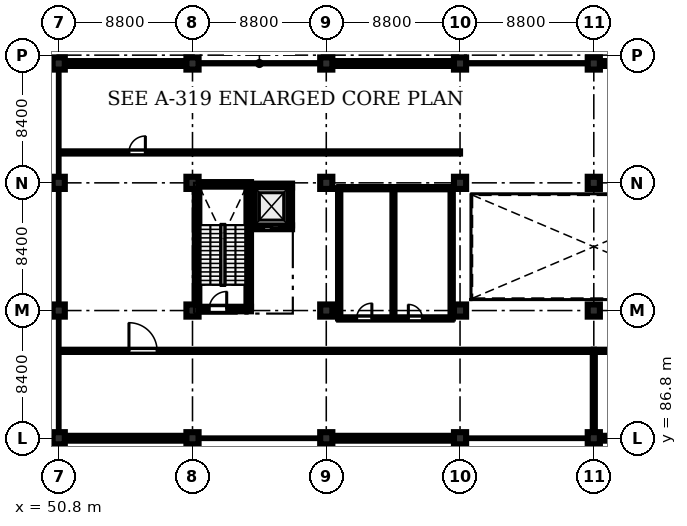
"""IFC4 building model, lengths in metres.
Left out: names, types, materials, properties, quantities, classifications, styles, units other than length and angle.
Written with IfcOpenShell. Run it as: python <this file> out.ifc"""

import sys

from ifc_helpers import new_model, si_unit, direction, frame, frame_2d, origin, origin_2d, place, context, subcontext, project, spatial, rectangle, extrude, element, fill, save


model = new_model("IFC4")
c1 = context("Model", 3, precision=1e-05, world=origin(), true_north=direction((0.0, 1.0)))
c2 = subcontext(c1, "Body", "Model", "MODEL_VIEW")
j1 = project(units=[si_unit("LENGTHUNIT", "METRE"), si_unit("PLANEANGLEUNIT", "RADIAN")], contexts=[c1])
p1 = place(None, origin())
s1 = spatial("IfcSite", under=j1, at=p1, CompositionType="ELEMENT")
p2 = place(p1, origin())
s2 = spatial("IfcBuilding", under=s1, at=p2, CompositionType="ELEMENT")
p3 = place(p2, frame((0.0, 0.0, 5.4)))
s3 = spatial("IfcBuildingStorey", under=s2, at=p3, CompositionType="ELEMENT", Elevation=5.4)
for number, where, z_axis, x_axis in (
    (1, (50.8, 86.8, 0.0), (0.0, 0.0, 1.0), (1.0, 0.0, 0.0)),
    (2, (50.8, 95.2, 0.0), (0.0, 0.0, 1.0), (1.0, 0.0, 0.0)),
    (3, (50.8, 103.6, 0.0), (0.0, 0.0, 1.0), (1.0, 0.0, 0.0)),
    (4, (50.8, 111.45, 0.0), (0.0, 0.0, 1.0), (1.0, 0.0, 0.0)),
    (5, (59.6, 86.8, 0.0), (0.0, 0.0, 1.0), (1.0, 0.0, 0.0)),
    (6, (59.6, 95.2, 0.0), (0.0, 0.0, 1.0), (1.0, 0.0, 0.0)),
    (7, (59.6, 103.6, 0.0), (0.0, 0.0, 1.0), (1.0, 0.0, 0.0)),
    (8, (59.6, 111.45, 0.0), (0.0, 0.0, 1.0), (1.0, 0.0, 0.0)),
    (9, (68.4, 86.8, 0.0), (0.0, 0.0, 1.0), (1.0, 0.0, 0.0)),
    (10, (68.4, 95.2, 0.0), (0.0, 0.0, 1.0), (1.0, 0.0, 0.0)),
    (11, (68.4, 103.6, 0.0), (0.0, 0.0, 1.0), (1.0, 0.0, 0.0)),
    (12, (68.4, 111.45, 0.0), (0.0, 0.0, 1.0), (1.0, 0.0, 0.0)),
    (13, (77.2, 86.8, 0.0), (0.0, 0.0, 1.0), (1.0, 0.0, 0.0)),
    (14, (77.2, 95.2, 0.0), (0.0, 0.0, 1.0), (1.0, 0.0, 0.0)),
    (15, (77.2, 103.6, 0.0), (0.0, 0.0, 1.0), (1.0, 0.0, 0.0)),
    (16, (77.2, 111.45, 0.0), (0.0, 0.0, 1.0), (1.0, 0.0, 0.0)),
    (17, (86.0, 86.8, 0.0), (0.0, 0.0, 1.0), (1.0, 0.0, 0.0)),
    (18, (86.0, 95.2, 0.0), (0.0, 0.0, 1.0), (1.0, 0.0, 0.0)),
    (19, (86.0, 103.6, 0.0), (0.0, 0.0, 1.0), (1.0, 0.0, 0.0)),
    (20, (86.0, 111.45, 0.0), (0.0, 0.0, 1.0), (1.0, 0.0, 0.0)),
):
    element("IfcColumn", number, at=place(p3, frame(where, z_axis=z_axis, x_axis=x_axis)), inside=s3, PredefinedType="COLUMN", context=c2, shape_type="SweptSolid", body=[
        extrude(rectangle(XDim=0.8, YDim=0.8, at=origin_2d()), origin(), (0.0, 0.0, 1.0), 4.58),
    ])
p4 = place(p3, frame((59.75, 95.3, 0.0), z_axis=(0.0, 0.0, 1.0), x_axis=(1.0, 0.0, 0.0)))
e21 = element("IfcWall", 21, at=p4, inside=s3, PredefinedType="SHEAR", context=c2, shape_type="SweptSolid", body=[
    extrude(rectangle(XDim=3.7, YDim=0.3, at=frame_2d((1.85, 0.0))), origin(), (0.0, 0.0, 1.0), 4.58),
])
p5 = place(p4, frame((0.95, 0.0, 0.0)))
e22 = element("IfcOpeningElement", 22, at=p5, cuts=e21, PredefinedType="OPENING", context=c2, shape_type="SweptSolid", body=[
    extrude(rectangle(XDim=1.15, YDim=2.15, at=frame_2d((0.575, 1.075))), frame((0.0, 0.16, 0.0), z_axis=(0.0, -1.0, 0.0), x_axis=(1.0, 0.0, 0.0)), (0.0, 0.0, 1.0), 0.32),
])
p6 = place(p3, frame((59.75, 103.5, 0.0), z_axis=(0.0, 0.0, 1.0), x_axis=(1.0, 0.0, 0.0)))
e23 = element("IfcWall", 23, at=p6, inside=s3, PredefinedType="SHEAR", context=c2, shape_type="SweptSolid", body=[
    extrude(rectangle(XDim=3.7, YDim=0.3, at=frame_2d((1.85, 0.0))), origin(), (0.0, 0.0, 1.0), 4.58),
])
for number, where, z_axis, x_axis in (
    (24, (59.9, 95.45, 0.0), (0.0, 0.0, 1.0), (0.0, 1.0, 0.0)),
    (25, (63.3, 95.45, 0.0), (0.0, 0.0, 1.0), (0.0, 1.0, 0.0)),
):
    element("IfcWall", number, at=place(p3, frame(where, z_axis=z_axis, x_axis=x_axis)), inside=s3, PredefinedType="SHEAR", context=c2, shape_type="SweptSolid", body=[
        extrude(rectangle(XDim=7.9, YDim=0.3, at=frame_2d((3.95, 0.0))), origin(), (0.0, 0.0, 1.0), 4.58),
    ])
p7 = place(p3, frame((63.45, 100.675, 0.0), z_axis=(0.0, 0.0, 1.0), x_axis=(1.0, 0.0, 0.0)))
e26 = element("IfcWall", 26, at=p7, inside=s3, PredefinedType="SHEAR", context=c2, shape_type="SweptSolid", body=[
    extrude(rectangle(XDim=2.7, YDim=0.25, at=frame_2d((1.35, 0.0))), origin(), (0.0, 0.0, 1.0), 4.58),
])
p8 = place(p7, frame((0.83, 0.0, 0.0)))
e27 = element("IfcOpeningElement", 27, at=p8, cuts=e26, PredefinedType="OPENING", context=c2, shape_type="SweptSolid", body=[
    extrude(rectangle(XDim=1.04, YDim=2.15, at=frame_2d((0.52, 1.075))), frame((0.0, 0.135, 0.0), z_axis=(0.0, -1.0, 0.0), x_axis=(1.0, 0.0, 0.0)), (0.0, 0.0, 1.0), 0.27),
])
p9 = place(p3, frame((63.45, 103.425, 0.0), z_axis=(0.0, 0.0, 1.0), x_axis=(1.0, 0.0, 0.0)))
e28 = element("IfcWall", 28, at=p9, inside=s3, PredefinedType="SHEAR", context=c2, shape_type="SweptSolid", body=[
    extrude(rectangle(XDim=2.7, YDim=0.25, at=frame_2d((1.35, 0.0))), origin(), (0.0, 0.0, 1.0), 4.58),
])
for number, where, z_axis, x_axis in (
    (29, (63.575, 100.8, 0.0), (0.0, 0.0, 1.0), (0.0, 1.0, 0.0)),
    (30, (66.025, 100.8, 0.0), (0.0, 0.0, 1.0), (0.0, 1.0, 0.0)),
):
    element("IfcWall", number, at=place(p3, frame(where, z_axis=z_axis, x_axis=x_axis)), inside=s3, PredefinedType="SHEAR", context=c2, shape_type="SweptSolid", body=[
        extrude(rectangle(XDim=2.5, YDim=0.25, at=frame_2d((1.25, 0.0))), origin(), (0.0, 0.0, 1.0), 4.58),
    ])
p10 = place(p3, frame((51.2, 111.45, 0.0), z_axis=(0.0, 0.0, 1.0), x_axis=(1.0, 0.0, 0.0)))
e31 = element("IfcWall", 31, at=p10, inside=s3, PredefinedType="STANDARD", context=c2, shape_type="SweptSolid", body=[
    extrude(rectangle(XDim=8.0, YDim=0.32, at=frame_2d((4.0, 0.0))), origin(), (0.0, 0.0, 1.0), 3.83),
])
p11 = place(p10, frame((1.1, 0.0, 0.9)))
e32 = element("IfcOpeningElement", 32, at=p11, cuts=e31, PredefinedType="OPENING", context=c2, shape_type="SweptSolid", body=[
    extrude(rectangle(XDim=2.4, YDim=2.2, at=frame_2d((1.2, 1.1))), frame((0.0, 0.17, 0.0), z_axis=(0.0, -1.0, 0.0), x_axis=(1.0, 0.0, 0.0)), (0.0, 0.0, 1.0), 0.34),
])
p12 = place(p10, frame((4.7, 0.0, 0.9)))
e33 = element("IfcOpeningElement", 33, at=p12, cuts=e31, PredefinedType="OPENING", context=c2, shape_type="SweptSolid", body=[
    extrude(rectangle(XDim=2.4, YDim=2.2, at=frame_2d((1.2, 1.1))), frame((0.0, 0.17, 0.0), z_axis=(0.0, -1.0, 0.0), x_axis=(1.0, 0.0, 0.0)), (0.0, 0.0, 1.0), 0.34),
])
p13 = place(p3, frame((59.2, 86.8, 0.0), z_axis=(0.0, 0.0, 1.0), x_axis=(-1.0, 0.0, 0.0)))
e34 = element("IfcWall", 34, at=p13, inside=s3, PredefinedType="STANDARD", context=c2, shape_type="SweptSolid", body=[
    extrude(rectangle(XDim=8.0, YDim=0.32, at=frame_2d((4.0, 0.0))), origin(), (0.0, 0.0, 1.0), 3.93),
])
p14 = place(p13, frame((2.8, 0.0, 0.95)))
e35 = element("IfcOpeningElement", 35, at=p14, cuts=e34, PredefinedType="OPENING", context=c2, shape_type="SweptSolid", body=[
    extrude(rectangle(XDim=2.0, YDim=2.2, at=frame_2d((1.0, 1.1))), frame((0.0, 0.17, 0.0), z_axis=(0.0, -1.0, 0.0), x_axis=(1.0, 0.0, 0.0)), (0.0, 0.0, 1.0), 0.34),
])
p15 = place(p3, frame((68.8, 111.45, 0.0), z_axis=(0.0, 0.0, 1.0), x_axis=(1.0, 0.0, 0.0)))
e36 = element("IfcWall", 36, at=p15, inside=s3, PredefinedType="STANDARD", context=c2, shape_type="SweptSolid", body=[
    extrude(rectangle(XDim=8.0, YDim=0.32, at=frame_2d((4.0, 0.0))), origin(), (0.0, 0.0, 1.0), 3.83),
])
p16 = place(p15, frame((1.1, 0.0, 0.9)))
e37 = element("IfcOpeningElement", 37, at=p16, cuts=e36, PredefinedType="OPENING", context=c2, shape_type="SweptSolid", body=[
    extrude(rectangle(XDim=2.4, YDim=2.2, at=frame_2d((1.2, 1.1))), frame((0.0, 0.17, 0.0), z_axis=(0.0, -1.0, 0.0), x_axis=(1.0, 0.0, 0.0)), (0.0, 0.0, 1.0), 0.34),
])
p17 = place(p15, frame((4.7, 0.0, 0.9)))
e38 = element("IfcOpeningElement", 38, at=p17, cuts=e36, PredefinedType="OPENING", context=c2, shape_type="SweptSolid", body=[
    extrude(rectangle(XDim=2.4, YDim=2.2, at=frame_2d((1.2, 1.1))), frame((0.0, 0.17, 0.0), z_axis=(0.0, -1.0, 0.0), x_axis=(1.0, 0.0, 0.0)), (0.0, 0.0, 1.0), 0.34),
])
p18 = place(p3, frame((76.8, 86.8, 0.0), z_axis=(0.0, 0.0, 1.0), x_axis=(-1.0, 0.0, 0.0)))
e39 = element("IfcWall", 39, at=p18, inside=s3, PredefinedType="STANDARD", context=c2, shape_type="SweptSolid", body=[
    extrude(rectangle(XDim=8.0, YDim=0.32, at=frame_2d((4.0, 0.0))), origin(), (0.0, 0.0, 1.0), 3.93),
])
p19 = place(p18, frame((2.8, 0.0, 0.95)))
e40 = element("IfcOpeningElement", 40, at=p19, cuts=e39, PredefinedType="OPENING", context=c2, shape_type="SweptSolid", body=[
    extrude(rectangle(XDim=2.0, YDim=2.2, at=frame_2d((1.0, 1.1))), frame((0.0, 0.17, 0.0), z_axis=(0.0, -1.0, 0.0), x_axis=(1.0, 0.0, 0.0)), (0.0, 0.0, 1.0), 0.34),
])
p20 = place(p3, frame((86.4, 111.45, 0.0), z_axis=(0.0, 0.0, 1.0), x_axis=(1.0, 0.0, 0.0)))
e41 = element("IfcWall", 41, at=p20, inside=s3, PredefinedType="STANDARD", context=c2, shape_type="SweptSolid", body=[
    extrude(rectangle(XDim=8.0, YDim=0.32, at=frame_2d((4.0, 0.0))), origin(), (0.0, 0.0, 1.0), 3.83),
])
p21 = place(p20, frame((1.1, 0.0, 0.9)))
e42 = element("IfcOpeningElement", 42, at=p21, cuts=e41, PredefinedType="OPENING", context=c2, shape_type="SweptSolid", body=[
    extrude(rectangle(XDim=2.4, YDim=2.2, at=frame_2d((1.2, 1.1))), frame((0.0, 0.17, 0.0), z_axis=(0.0, -1.0, 0.0), x_axis=(1.0, 0.0, 0.0)), (0.0, 0.0, 1.0), 0.34),
])
p22 = place(p20, frame((4.7, 0.0, 0.9)))
e43 = element("IfcOpeningElement", 43, at=p22, cuts=e41, PredefinedType="OPENING", context=c2, shape_type="SweptSolid", body=[
    extrude(rectangle(XDim=2.4, YDim=2.2, at=frame_2d((1.2, 1.1))), frame((0.0, 0.17, 0.0), z_axis=(0.0, -1.0, 0.0), x_axis=(1.0, 0.0, 0.0)), (0.0, 0.0, 1.0), 0.34),
])
p23 = place(p3, frame((94.4, 86.8, 0.0), z_axis=(0.0, 0.0, 1.0), x_axis=(-1.0, 0.0, 0.0)))
e44 = element("IfcWall", 44, at=p23, inside=s3, PredefinedType="STANDARD", context=c2, shape_type="SweptSolid", body=[
    extrude(rectangle(XDim=8.0, YDim=0.32, at=frame_2d((4.0, 0.0))), origin(), (0.0, 0.0, 1.0), 3.93),
])
p24 = place(p23, frame((2.8, 0.0, 0.95)))
e45 = element("IfcOpeningElement", 45, at=p24, cuts=e44, PredefinedType="OPENING", context=c2, shape_type="SweptSolid", body=[
    extrude(rectangle(XDim=2.0, YDim=2.2, at=frame_2d((1.0, 1.1))), frame((0.0, 0.17, 0.0), z_axis=(0.0, -1.0, 0.0), x_axis=(1.0, 0.0, 0.0)), (0.0, 0.0, 1.0), 0.34),
])
p25 = place(p3, frame((69.25, 94.68, 0.0), z_axis=(0.0, 0.0, 1.0), x_axis=(1.0, 0.0, 0.0)))
e46 = element("IfcWall", 46, at=p25, inside=s3, PredefinedType="PARTITIONING", context=c2, shape_type="SweptSolid", body=[
    extrude(rectangle(XDim=7.4, YDim=0.15, at=frame_2d((3.7, 0.0))), origin(), (0.0, 0.0, 1.0), 4.58),
])
p26 = place(p25, frame((1.15, 0.0, 0.0)))
e47 = element("IfcOpeningElement", 47, at=p26, cuts=e46, PredefinedType="OPENING", context=c2, shape_type="SweptSolid", body=[
    extrude(rectangle(XDim=1.0, YDim=2.12, at=frame_2d((0.5, 1.06))), frame((0.0, 0.085, 0.0), z_axis=(0.0, -1.0, 0.0), x_axis=(1.0, 0.0, 0.0)), (0.0, 0.0, 1.0), 0.17),
])
p27 = place(p25, frame((4.55, 0.0, 0.0)))
e48 = element("IfcOpeningElement", 48, at=p27, cuts=e46, PredefinedType="OPENING", context=c2, shape_type="SweptSolid", body=[
    extrude(rectangle(XDim=0.92, YDim=2.1, at=frame_2d((0.46, 1.05))), frame((0.0, 0.085, 0.0), z_axis=(0.0, -1.0, 0.0), x_axis=(1.0, 0.0, 0.0)), (0.0, 0.0, 1.0), 0.17),
])
p28 = place(p3, frame((69.25, 94.68, 0.0), z_axis=(0.0, 0.0, 1.0), x_axis=(0.0, 1.0, 0.0)))
e49 = element("IfcWall", 49, at=p28, inside=s3, PredefinedType="PARTITIONING", context=c2, shape_type="SweptSolid", body=[
    extrude(rectangle(XDim=8.57, YDim=0.15, at=frame_2d((4.285, 0.0))), origin(), (0.0, 0.0, 1.0), 4.58),
])
p29 = place(p3, frame((72.82, 94.68, 0.0), z_axis=(0.0, 0.0, 1.0), x_axis=(0.0, 1.0, 0.0)))
e50 = element("IfcWall", 50, at=p29, inside=s3, PredefinedType="PARTITIONING", context=c2, shape_type="SweptSolid", body=[
    extrude(rectangle(XDim=8.57, YDim=0.135, at=frame_2d((4.285, 0.0))), origin(), (0.0, 0.0, 1.0), 4.24),
])
p30 = place(p3, frame((69.25, 103.25, 0.0), z_axis=(0.0, 0.0, 1.0), x_axis=(1.0, 0.0, 0.0)))
e51 = element("IfcWall", 51, at=p30, inside=s3, PredefinedType="PARTITIONING", context=c2, shape_type="SweptSolid", body=[
    extrude(rectangle(XDim=7.4, YDim=0.15, at=frame_2d((3.7, 0.0))), origin(), (0.0, 0.0, 1.0), 4.58),
])
p31 = place(p3, frame((76.65, 94.68, 0.0), z_axis=(0.0, 0.0, 1.0), x_axis=(0.0, 1.0, 0.0)))
e52 = element("IfcWall", 52, at=p31, inside=s3, PredefinedType="PARTITIONING", context=c2, shape_type="SweptSolid", body=[
    extrude(rectangle(XDim=8.57, YDim=0.15, at=frame_2d((4.285, 0.0))), origin(), (0.0, 0.0, 1.0), 4.58),
])
p32 = place(p3, frame((50.92, 92.55, 0.0), z_axis=(0.0, 0.0, 1.0), x_axis=(1.0, 0.0, 0.0)))
e53 = element("IfcWall", 53, at=p32, inside=s3, PredefinedType="PARTITIONING", context=c2, shape_type="SweptSolid", body=[
    extrude(rectangle(XDim=35.08, YDim=0.145, at=frame_2d((17.54, 0.0))), origin(), (0.0, 0.0, 1.0), 4.58),
])
p33 = place(p32, frame((4.5, 0.0, 0.0)))
e54 = element("IfcOpeningElement", 54, at=p33, cuts=e53, PredefinedType="OPENING", context=c2, shape_type="SweptSolid", body=[
    extrude(rectangle(XDim=1.85, YDim=2.25, at=frame_2d((0.925, 1.125))), frame((0.0, 0.083, 0.0), z_axis=(0.0, -1.0, 0.0), x_axis=(1.0, 0.0, 0.0)), (0.0, 0.0, 1.0), 0.165),
])
p34 = place(p3, frame((86.0, 92.55, 0.0), z_axis=(0.0, 0.0, 1.0), x_axis=(1.0, 0.0, 0.0)))
e55 = element("IfcWall", 55, at=p34, inside=s3, PredefinedType="PARTITIONING", context=c2, shape_type="SweptSolid", body=[
    extrude(rectangle(XDim=35.02, YDim=0.145, at=frame_2d((17.51, 0.0))), origin(), (0.0, 0.0, 1.0), 4.58),
])
p35 = place(p34, frame((4.5, 0.0, 0.0)))
e56 = element("IfcOpeningElement", 56, at=p35, cuts=e55, PredefinedType="OPENING", context=c2, shape_type="SweptSolid", body=[
    extrude(rectangle(XDim=1.85, YDim=2.25, at=frame_2d((0.925, 1.125))), frame((0.0, 0.083, 0.0), z_axis=(0.0, -1.0, 0.0), x_axis=(1.0, 0.0, 0.0)), (0.0, 0.0, 1.0), 0.165),
])
p36 = place(p3, frame((86.0, 86.95, 0.0), z_axis=(0.0, 0.0, 1.0), x_axis=(0.0, 1.0, 0.0)))
e57 = element("IfcWall", 57, at=p36, inside=s3, PredefinedType="PARTITIONING", context=c2, shape_type="SweptSolid", body=[
    extrude(rectangle(XDim=5.6, YDim=0.135, at=frame_2d((2.8, 0.0))), origin(), (0.0, 0.0, 1.0), 3.93),
])
p37 = place(p3, frame((50.92, 105.6, 0.0), z_axis=(0.0, 0.0, 1.0), x_axis=(1.0, 0.0, 0.0)))
e58 = element("IfcWall", 58, at=p37, inside=s3, PredefinedType="PARTITIONING", context=c2, shape_type="SweptSolid", body=[
    extrude(rectangle(XDim=26.28, YDim=0.145, at=frame_2d((13.14, 0.0))), origin(), (0.0, 0.0, 1.0), 4.58),
])
p38 = place(p37, frame((4.5, 0.0, 0.0)))
e59 = element("IfcOpeningElement", 59, at=p38, cuts=e58, PredefinedType="OPENING", context=c2, shape_type="SweptSolid", body=[
    extrude(rectangle(XDim=1.08, YDim=2.15, at=frame_2d((0.54, 1.075))), frame((0.0, 0.083, 0.0), z_axis=(0.0, -1.0, 0.0), x_axis=(1.0, 0.0, 0.0)), (0.0, 0.0, 1.0), 0.165),
])
p39 = place(p11, origin())
e60 = element("IfcWindow", 60, at=p39, inside=s3, PartitioningType="TRIPLE_PANEL_VERTICAL", PredefinedType="WINDOW", context=c2, shape_type="SweptSolid", body=[
    extrude(rectangle(XDim=2.4, YDim=2.2, at=frame_2d((1.2, 1.1))), frame((0.0, 0.03, 0.0), z_axis=(0.0, -1.0, 0.0), x_axis=(1.0, 0.0, 0.0)), (0.0, 0.0, 1.0), 0.06),
])
fill(e32, e60)
p40 = place(p12, origin())
e61 = element("IfcWindow", 61, at=p40, inside=s3, PartitioningType="TRIPLE_PANEL_VERTICAL", PredefinedType="WINDOW", context=c2, shape_type="SweptSolid", body=[
    extrude(rectangle(XDim=2.4, YDim=2.2, at=frame_2d((1.2, 1.1))), frame((0.0, 0.03, 0.0), z_axis=(0.0, -1.0, 0.0), x_axis=(1.0, 0.0, 0.0)), (0.0, 0.0, 1.0), 0.06),
])
fill(e33, e61)
p41 = place(p14, origin())
e62 = element("IfcWindow", 62, at=p41, inside=s3, PartitioningType="DOUBLE_PANEL_VERTICAL", PredefinedType="WINDOW", context=c2, shape_type="SweptSolid", body=[
    extrude(rectangle(XDim=2.0, YDim=2.2, at=frame_2d((1.0, 1.1))), frame((0.0, 0.03, 0.0), z_axis=(0.0, -1.0, 0.0), x_axis=(1.0, 0.0, 0.0)), (0.0, 0.0, 1.0), 0.06),
])
fill(e35, e62)
p42 = place(p16, origin())
e63 = element("IfcWindow", 63, at=p42, inside=s3, PartitioningType="TRIPLE_PANEL_VERTICAL", PredefinedType="WINDOW", context=c2, shape_type="SweptSolid", body=[
    extrude(rectangle(XDim=2.4, YDim=2.2, at=frame_2d((1.2, 1.1))), frame((0.0, 0.03, 0.0), z_axis=(0.0, -1.0, 0.0), x_axis=(1.0, 0.0, 0.0)), (0.0, 0.0, 1.0), 0.06),
])
fill(e37, e63)
p43 = place(p17, origin())
e64 = element("IfcWindow", 64, at=p43, inside=s3, PartitioningType="TRIPLE_PANEL_VERTICAL", PredefinedType="WINDOW", context=c2, shape_type="SweptSolid", body=[
    extrude(rectangle(XDim=2.4, YDim=2.2, at=frame_2d((1.2, 1.1))), frame((0.0, 0.03, 0.0), z_axis=(0.0, -1.0, 0.0), x_axis=(1.0, 0.0, 0.0)), (0.0, 0.0, 1.0), 0.06),
])
fill(e38, e64)
p44 = place(p19, origin())
e65 = element("IfcWindow", 65, at=p44, inside=s3, PartitioningType="DOUBLE_PANEL_VERTICAL", PredefinedType="WINDOW", context=c2, shape_type="SweptSolid", body=[
    extrude(rectangle(XDim=2.0, YDim=2.2, at=frame_2d((1.0, 1.1))), frame((0.0, 0.03, 0.0), z_axis=(0.0, -1.0, 0.0), x_axis=(1.0, 0.0, 0.0)), (0.0, 0.0, 1.0), 0.06),
])
fill(e40, e65)
p45 = place(p26, origin())
e66 = element("IfcDoor", 66, at=p45, inside=s3, OperationType="SINGLE_SWING_RIGHT", PredefinedType="DOOR", context=c2, shape_type="SweptSolid", body=[
    extrude(rectangle(XDim=1.0, YDim=2.12, at=frame_2d((0.5, 1.06))), frame((0.0, 0.025, 0.0), z_axis=(0.0, -1.0, 0.0), x_axis=(1.0, 0.0, 0.0)), (0.0, 0.0, 1.0), 0.05),
])
fill(e47, e66)
p46 = place(p27, origin())
e67 = element("IfcDoor", 67, at=p46, inside=s3, OperationType="SINGLE_SWING_LEFT", PredefinedType="DOOR", context=c2, shape_type="SweptSolid", body=[
    extrude(rectangle(XDim=0.92, YDim=2.1, at=frame_2d((0.46, 1.05))), frame((0.0, 0.025, 0.0), z_axis=(0.0, -1.0, 0.0), x_axis=(1.0, 0.0, 0.0)), (0.0, 0.0, 1.0), 0.05),
])
fill(e48, e67)
p47 = place(p33, origin())
e68 = element("IfcDoor", 68, at=p47, inside=s3, OperationType="SINGLE_SWING_LEFT", PredefinedType="DOOR", context=c2, shape_type="SweptSolid", body=[
    extrude(rectangle(XDim=1.85, YDim=2.25, at=frame_2d((0.925, 1.125))), frame((0.0, 0.025, 0.0), z_axis=(0.0, -1.0, 0.0), x_axis=(1.0, 0.0, 0.0)), (0.0, 0.0, 1.0), 0.05),
])
fill(e54, e68)
p48 = place(p38, origin())
e69 = element("IfcDoor", 69, at=p48, inside=s3, OperationType="SINGLE_SWING_RIGHT", PredefinedType="DOOR", context=c2, shape_type="SweptSolid", body=[
    extrude(rectangle(XDim=1.08, YDim=2.15, at=frame_2d((0.54, 1.075))), frame((0.0, 0.025, 0.0), z_axis=(0.0, -1.0, 0.0), x_axis=(1.0, 0.0, 0.0)), (0.0, 0.0, 1.0), 0.05),
])
fill(e59, e69)
p49 = place(p5, origin())
e70 = element("IfcDoor", 70, at=p49, inside=s3, OperationType="SINGLE_SWING_RIGHT", PredefinedType="DOOR", context=c2, shape_type="SweptSolid", body=[
    extrude(rectangle(XDim=1.15, YDim=2.15, at=frame_2d((0.575, 1.075))), frame((0.0, 0.025, 0.0), z_axis=(0.0, -1.0, 0.0), x_axis=(1.0, 0.0, 0.0)), (0.0, 0.0, 1.0), 0.05),
])
fill(e22, e70)
p50 = place(p8, origin())
e71 = element("IfcDoor", 71, at=p50, inside=s3, OperationType="SLIDING_TO_LEFT", PredefinedType="DOOR", context=c2, shape_type="SweptSolid", body=[
    extrude(rectangle(XDim=1.04, YDim=2.15, at=frame_2d((0.52, 1.075))), frame((0.0, 0.025, 0.0), z_axis=(0.0, -1.0, 0.0), x_axis=(1.0, 0.0, 0.0)), (0.0, 0.0, 1.0), 0.05),
])
fill(e27, e71)
save(model, sys.argv[1])
